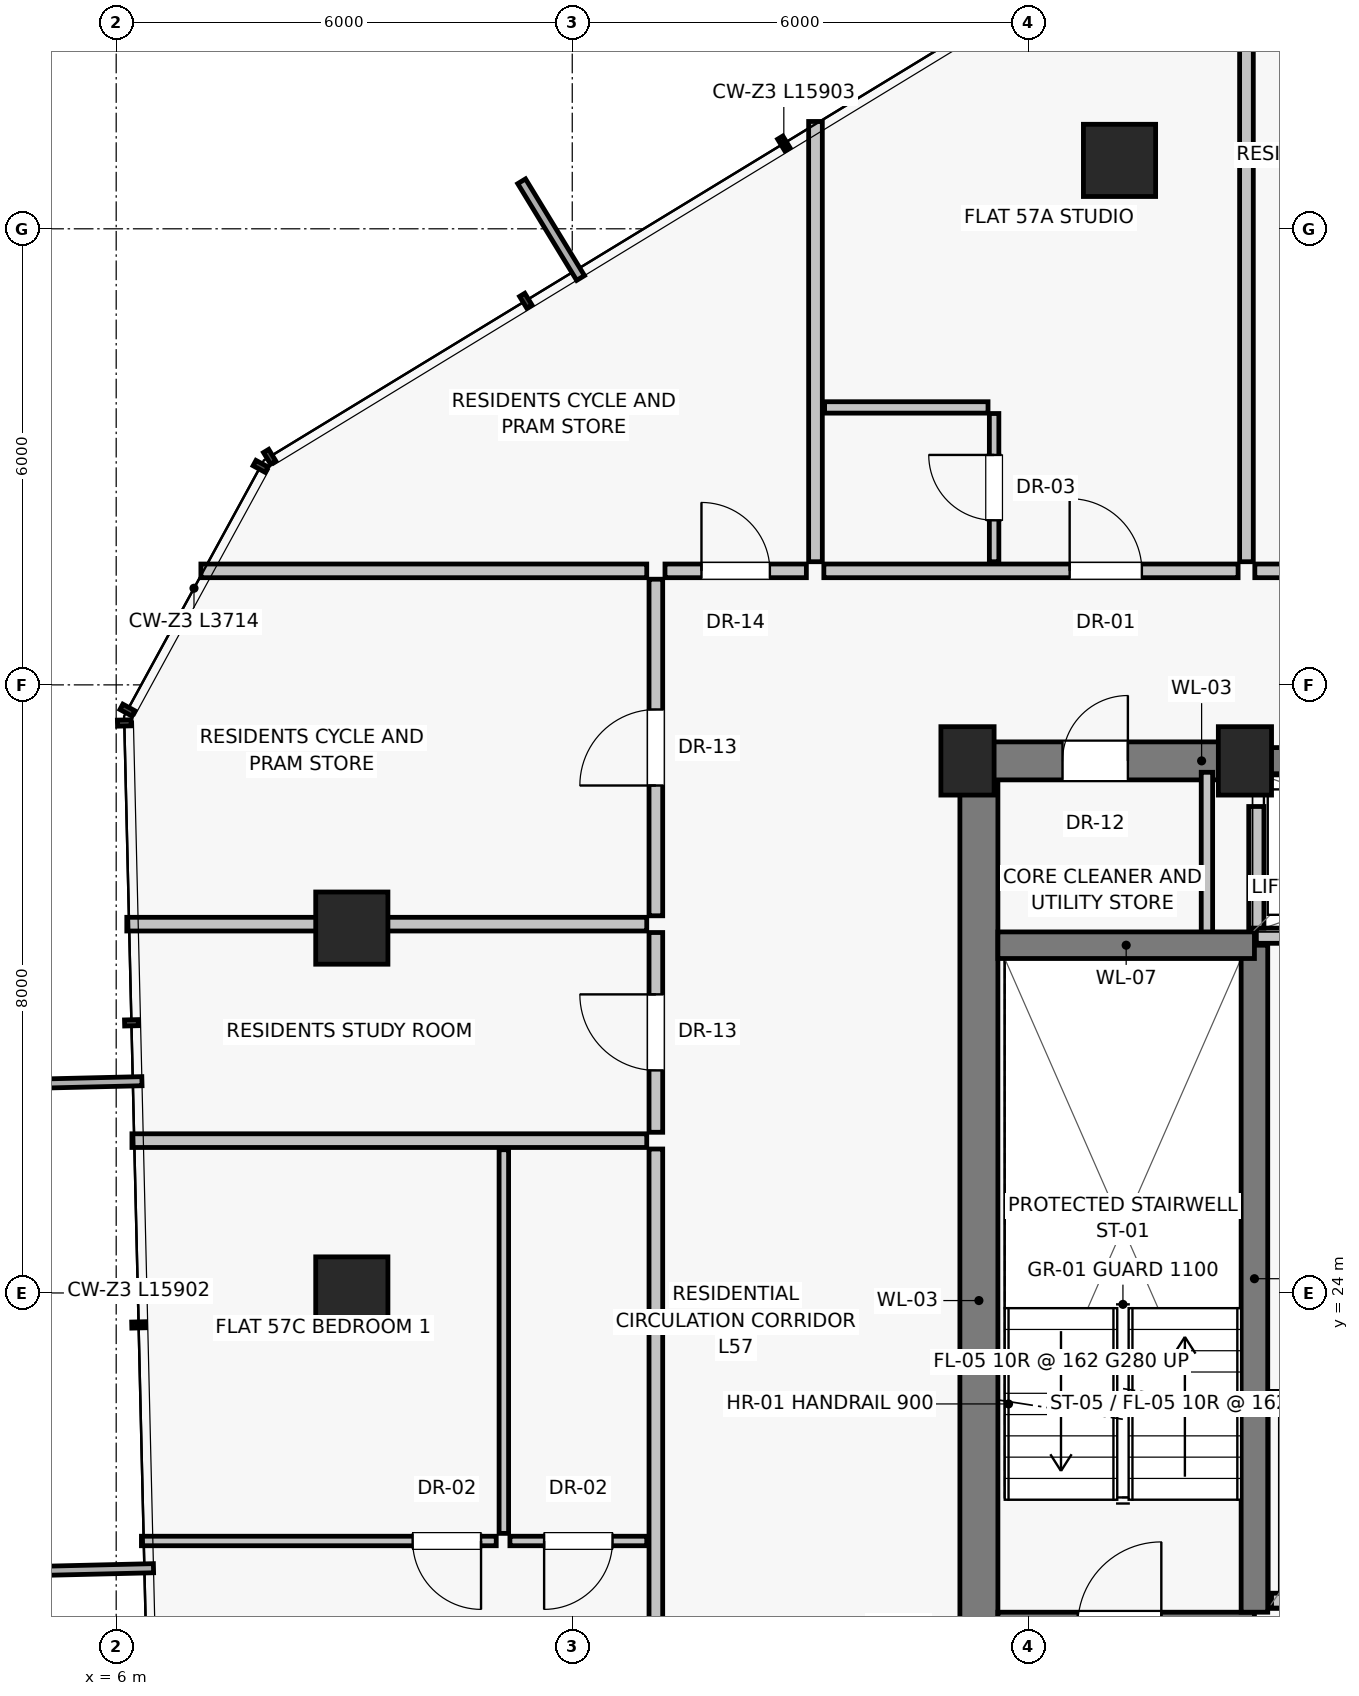
"""IFC4 building model, lengths in metres.
Left out: names, types, materials, properties, quantities, classifications, styles, units other than length and angle.
Written with IfcOpenShell. Run it as: python <this file> out.ifc"""

import sys

from ifc_helpers import new_model, si_unit, direction, frame, frame_2d, origin, origin_2d, place, context, subcontext, project, spatial, rectangle, extrude, source, transform, mapped, element, fill, save


model = new_model("IFC4")
c1 = context("Model", 3, precision=1e-05, world=origin(), true_north=direction((0.0, 1.0)))
c2 = subcontext(c1, "Body", "Model", "MODEL_VIEW")
j1 = project(units=[si_unit("LENGTHUNIT", "METRE"), si_unit("PLANEANGLEUNIT", "RADIAN")], contexts=[c1])
p1 = place(None, origin())
s1 = spatial("IfcSite", under=j1, at=p1, CompositionType="ELEMENT")
p2 = place(p1, origin())
s2 = spatial("IfcBuilding", under=s1, at=p2, CompositionType="ELEMENT")
p3 = place(p2, frame((0.0, 0.0, 201.6)))
s3 = spatial("IfcBuildingStorey", under=s2, at=p3, CompositionType="ELEMENT", Elevation=201.6)
for number, where, z_axis, x_axis in (
    (1, (17.2, 31.0, 0.0), (0.0, 0.0, 1.0), (1.0, 0.0, 0.0)),
    (2, (20.85, 31.0, 0.0), (0.0, 0.0, 1.0), (1.0, 0.0, 0.0)),
):
    element("IfcColumn", number, at=place(p3, frame(where, z_axis=z_axis, x_axis=x_axis)), inside=s3, PredefinedType="PILASTER", context=c2, shape_type="SweptSolid", body=[
        extrude(rectangle(XDim=0.7, YDim=0.9, at=origin_2d()), origin(), (0.0, 0.0, 1.0), 3.25),
    ])
for number, where, z_axis, x_axis in (
    (3, (19.2, 38.9, 0.0), (0.0, 0.0, 1.0), (1.0, 0.0, 0.0)),
    (4, (9.1, 28.8, 0.0), (0.0, 0.0, 1.0), (1.0, 0.0, 0.0)),
    (5, (9.1, 24.0, 0.0), (0.0, 0.0, 1.0), (1.0, 0.0, 0.0)),
):
    element("IfcColumn", number, at=place(p3, frame(where, z_axis=z_axis, x_axis=x_axis)), inside=s3, PredefinedType="COLUMN", context=c2, shape_type="SweptSolid", body=[
        extrude(rectangle(XDim=0.95, YDim=0.95, at=origin_2d()), origin(), (0.0, 0.0, 1.0), 3.25),
    ])
p4 = place(p3, frame((17.35, 16.8, 0.0), z_axis=(0.0, 0.0, 1.0), x_axis=(0.0, 1.0, 0.0)))
e6 = element("IfcWall", 6, at=p4, inside=s3, PredefinedType="SHEAR", context=c2, shape_type="SweptSolid", body=[
    extrude(rectangle(XDim=14.2, YDim=0.5, at=frame_2d((7.1, 0.0))), origin(), (0.0, 0.0, 1.0), 3.015),
])
p5 = place(p3, frame((17.2, 31.0, 0.0), z_axis=(0.0, 0.0, 1.0), x_axis=(1.0, 0.0, 0.0)))
e7 = element("IfcWall", 7, at=p5, inside=s3, PredefinedType="SHEAR", context=c2, shape_type="SweptSolid", body=[
    extrude(rectangle(XDim=3.8, YDim=0.5, at=frame_2d((1.9, 0.0))), origin(), (0.0, 0.0, 1.0), 3.015),
])
p6 = place(p5, frame((1.25, 0.0, 0.0)))
e8 = element("IfcOpeningElement", 8, at=p6, cuts=e7, PredefinedType="OPENING", context=c2, shape_type="SweptSolid", body=[
    extrude(rectangle(XDim=0.86, YDim=2.01, at=frame_2d((0.43, 1.005))), frame((0.0, 0.26, 0.0), z_axis=(0.0, -1.0, 0.0), x_axis=(1.0, 0.0, 0.0)), (0.0, 0.0, 1.0), 0.52),
])
p7 = place(p3, frame((21.0, 31.0, 0.0), z_axis=(0.0, 0.0, 1.0), x_axis=(1.0, 0.0, 0.0)))
e9 = element("IfcWall", 9, at=p7, inside=s3, PredefinedType="SHEAR", context=c2, shape_type="SweptSolid", body=[
    extrude(rectangle(XDim=6.0, YDim=0.35, at=frame_2d((3.0, 0.0))), origin(), (0.0, 0.0, 1.0), 3.015),
])
p8 = place(p7, frame((0.5, 0.0, 0.0)))
e10 = element("IfcOpeningElement", 10, at=p8, cuts=e9, PredefinedType="OPENING", context=c2, shape_type="SweptSolid", body=[
    extrude(rectangle(XDim=1.1, YDim=2.08, at=frame_2d((0.55, 1.04))), frame((0.0, 0.185, 0.0), z_axis=(0.0, -1.0, 0.0), x_axis=(1.0, 0.0, 0.0)), (0.0, 0.0, 1.0), 0.37),
])
p9 = place(p7, frame((2.45, 0.0, 0.0)))
e11 = element("IfcOpeningElement", 11, at=p9, cuts=e9, PredefinedType="OPENING", context=c2, shape_type="SweptSolid", body=[
    extrude(rectangle(XDim=1.1, YDim=2.08, at=frame_2d((0.55, 1.04))), frame((0.0, 0.185, 0.0), z_axis=(0.0, -1.0, 0.0), x_axis=(1.0, 0.0, 0.0)), (0.0, 0.0, 1.0), 0.37),
])
p10 = place(p7, frame((4.4, 0.0, 0.0)))
e12 = element("IfcOpeningElement", 12, at=p10, cuts=e9, PredefinedType="OPENING", context=c2, shape_type="SweptSolid", body=[
    extrude(rectangle(XDim=1.1, YDim=2.08, at=frame_2d((0.55, 1.04))), frame((0.0, 0.185, 0.0), z_axis=(0.0, -1.0, 0.0), x_axis=(1.0, 0.0, 0.0)), (0.0, 0.0, 1.0), 0.37),
])
p11 = place(p3, frame((20.35, 28.65, 0.0), z_axis=(0.0, 0.0, 1.0), x_axis=(0.0, 1.0, 0.0)))
e13 = element("IfcWall", 13, at=p11, inside=s3, PredefinedType="PARTITIONING", context=c2, shape_type="SweptSolid", body=[
    extrude(rectangle(XDim=2.2, YDim=0.15, at=frame_2d((1.1, 0.0))), origin(), (0.0, 0.0, 1.0), 3.015),
])
p12 = place(p3, frame((17.6, 19.625, 0.0), z_axis=(0.0, 0.0, 1.0), x_axis=(1.0, 0.0, 0.0)))
e14 = element("IfcWall", 14, at=p12, inside=s3, PredefinedType="SHEAR", context=c2, shape_type="SweptSolid", body=[
    extrude(rectangle(XDim=3.375, YDim=0.35, at=frame_2d((1.688, 0.0))), origin(), (0.0, 0.0, 1.0), 3.015),
])
p13 = place(p12, frame((1.05, 0.0, 0.0)))
e15 = element("IfcOpeningElement", 15, at=p13, cuts=e14, PredefinedType="OPENING", context=c2, shape_type="SweptSolid", body=[
    extrude(rectangle(XDim=1.1, YDim=2.03, at=frame_2d((0.55, 1.015))), frame((0.0, 0.185, 0.0), z_axis=(0.0, -1.0, 0.0), x_axis=(1.0, 0.0, 0.0)), (0.0, 0.0, 1.0), 0.37),
])
p14 = place(p3, frame((21.2, 19.95, 0.0), z_axis=(0.0, 0.0, 1.0), x_axis=(1.0, 0.0, 0.0)))
e16 = element("IfcWall", 16, at=p14, inside=s3, PredefinedType="SOLIDWALL", context=c2, shape_type="SweptSolid", body=[
    extrude(rectangle(XDim=1.85, YDim=0.2, at=frame_2d((0.925, 0.0))), origin(), (0.0, 0.0, 1.0), 3.015),
])
p15 = place(p14, frame((0.3, 0.0, 0.0)))
e17 = element("IfcOpeningElement", 17, at=p15, cuts=e16, PredefinedType="OPENING", context=c2, shape_type="SweptSolid", body=[
    extrude(rectangle(XDim=1.3, YDim=2.25, at=frame_2d((0.65, 1.125))), frame((0.0, 0.11, 0.0), z_axis=(0.0, -1.0, 0.0), x_axis=(1.0, 0.0, 0.0)), (0.0, 0.0, 1.0), 0.22),
])
p16 = place(p3, frame((20.975, 19.8, 0.0), z_axis=(0.0, 0.0, 1.0), x_axis=(0.0, 1.0, 0.0)))
e18 = element("IfcWall", 18, at=p16, inside=s3, PredefinedType="SHEAR", context=c2, shape_type="SweptSolid", body=[
    extrude(rectangle(XDim=8.775, YDim=0.35, at=frame_2d((4.387, 0.0))), origin(), (0.0, 0.0, 1.0), 3.015),
])
p17 = place(p3, frame((17.6, 28.575, 0.0), z_axis=(0.0, 0.0, 1.0), x_axis=(1.0, 0.0, 0.0)))
e19 = element("IfcWall", 19, at=p17, inside=s3, PredefinedType="SHEAR", context=c2, shape_type="SweptSolid", body=[
    extrude(rectangle(XDim=3.375, YDim=0.35, at=frame_2d((1.688, 0.0))), origin(), (0.0, 0.0, 1.0), 3.015),
])
p18 = place(p3, frame((21.2, 22.6, 0.0), z_axis=(0.0, 0.0, 1.0), x_axis=(1.0, 0.0, 0.0)))
e20 = element("IfcWall", 20, at=p18, inside=s3, PredefinedType="SOLIDWALL", context=c2, shape_type="SweptSolid", body=[
    extrude(rectangle(XDim=1.85, YDim=0.2, at=frame_2d((0.925, 0.0))), origin(), (0.0, 0.0, 1.0), 3.015),
])
p19 = place(p3, frame((21.0, 28.7, 0.0), z_axis=(0.0, 0.0, 1.0), x_axis=(1.0, 0.0, 0.0)))
e21 = element("IfcWall", 21, at=p19, inside=s3, PredefinedType="SOLIDWALL", context=c2, shape_type="SweptSolid", body=[
    extrude(rectangle(XDim=6.0, YDim=0.2, at=frame_2d((3.0, 0.0))), origin(), (0.0, 0.0, 1.0), 3.015),
])
p20 = place(p3, frame((21.0, 28.8, 0.0), z_axis=(0.0, 0.0, 1.0), x_axis=(0.0, 1.0, 0.0)))
e22 = element("IfcWall", 22, at=p20, inside=s3, PredefinedType="SOLIDWALL", context=c2, shape_type="SweptSolid", body=[
    extrude(rectangle(XDim=1.6, YDim=0.2, at=frame_2d((0.8, 0.0))), origin(), (0.0, 0.0, 1.0), 3.015),
])
p21 = place(p3, frame((15.2, 33.62, 0.0), z_axis=(0.0, 0.0, 1.0), x_axis=(0.0, 1.0, 0.0)))
e23 = element("IfcWall", 23, at=p21, inside=s3, PredefinedType="PARTITIONING", context=c2, shape_type="SweptSolid", body=[
    extrude(rectangle(XDim=5.792, YDim=0.18, at=frame_2d((2.896, 0.0))), origin(), (0.0, 0.0, 1.0), 3.015),
])
p22 = place(p3, frame((20.98, 33.5, 0.0), z_axis=(0.0, 0.0, 1.0), x_axis=(1.0, 0.0, 0.0)))
e24 = element("IfcWall", 24, at=p22, inside=s3, PredefinedType="PARTITIONING", context=c2, shape_type="SweptSolid", body=[
    extrude(rectangle(XDim=2.73, YDim=0.18, at=frame_2d((1.365, 0.0))), origin(), (0.0, 0.0, 1.0), 3.015),
])
p23 = place(p22, frame((0.865, 0.0, 0.0)))
e25 = element("IfcOpeningElement", 25, at=p23, cuts=e24, PredefinedType="OPENING", context=c2, shape_type="SweptSolid", body=[
    extrude(rectangle(XDim=1.0, YDim=2.01, at=frame_2d((0.5, 1.005))), frame((0.0, 0.1, 0.0), z_axis=(0.0, -1.0, 0.0), x_axis=(1.0, 0.0, 0.0)), (0.0, 0.0, 1.0), 0.2),
])
p24 = place(p3, frame((20.87, 33.62, 0.0), z_axis=(0.0, 0.0, 1.0), x_axis=(0.0, 1.0, 0.0)))
e26 = element("IfcWall", 26, at=p24, inside=s3, PredefinedType="PARTITIONING", context=c2, shape_type="SweptSolid", body=[
    extrude(rectangle(XDim=9.248, YDim=0.18, at=frame_2d((4.624, 0.0))), origin(), (0.0, 0.0, 1.0), 3.015),
])
p25 = place(p3, frame((15.31, 33.5, 0.0), z_axis=(0.0, 0.0, 1.0), x_axis=(1.0, 0.0, 0.0)))
e27 = element("IfcWall", 27, at=p25, inside=s3, PredefinedType="PARTITIONING", context=c2, shape_type="SweptSolid", body=[
    extrude(rectangle(XDim=5.45, YDim=0.18, at=frame_2d((2.725, 0.0))), origin(), (0.0, 0.0, 1.0), 3.015),
])
p26 = place(p25, frame((3.234, 0.0, 0.0)))
e28 = element("IfcOpeningElement", 28, at=p26, cuts=e27, PredefinedType="OPENING", context=c2, shape_type="SweptSolid", body=[
    extrude(rectangle(XDim=0.95, YDim=2.02, at=frame_2d((0.475, 1.01))), frame((0.0, 0.1, 0.0), z_axis=(0.0, -1.0, 0.0), x_axis=(1.0, 0.0, 0.0)), (0.0, 0.0, 1.0), 0.2),
])
p27 = place(p3, frame((17.55, 33.62, 0.0), z_axis=(0.0, 0.0, 1.0), x_axis=(0.0, 1.0, 0.0)))
e29 = element("IfcWall", 29, at=p27, inside=s3, PredefinedType="PARTITIONING", context=c2, shape_type="SweptSolid", body=[
    extrude(rectangle(XDim=1.95, YDim=0.125, at=frame_2d((0.975, 0.0))), origin(), (0.0, 0.0, 1.0), 3.015),
])
p28 = place(p27, frame((0.545, 0.0, 0.0)))
e30 = element("IfcOpeningElement", 30, at=p28, cuts=e29, PredefinedType="OPENING", context=c2, shape_type="SweptSolid", body=[
    extrude(rectangle(XDim=0.86, YDim=2.01, at=frame_2d((0.43, 1.005))), frame((0.0, 0.073, 0.0), z_axis=(0.0, -1.0, 0.0), x_axis=(1.0, 0.0, 0.0)), (0.0, 0.0, 1.0), 0.145),
])
p29 = place(p3, frame((15.32, 35.65, 0.0), z_axis=(0.0, 0.0, 1.0), x_axis=(1.0, 0.0, 0.0)))
e31 = element("IfcWall", 31, at=p29, inside=s3, PredefinedType="PARTITIONING", context=c2, shape_type="SweptSolid", body=[
    extrude(rectangle(XDim=2.15, YDim=0.15, at=frame_2d((1.075, 0.0))), origin(), (0.0, 0.0, 1.0), 3.015),
])
p30 = place(p3, frame((12.98, 33.5, 0.0), z_axis=(0.0, 0.0, 1.0), x_axis=(-1.0, 0.0, 0.0)))
e32 = element("IfcWall", 32, at=p30, inside=s3, PredefinedType="PARTITIONING", context=c2, shape_type="SweptSolid", body=[
    extrude(rectangle(XDim=5.866, YDim=0.18, at=frame_2d((2.933, 0.0))), origin(), (0.0, 0.0, 1.0), 3.015),
])
p31 = place(p3, frame((13.1, 14.41, 0.0), z_axis=(0.0, 0.0, 1.0), x_axis=(0.0, 1.0, 0.0)))
e33 = element("IfcWall", 33, at=p31, inside=s3, PredefinedType="PARTITIONING", context=c2, shape_type="SweptSolid", body=[
    extrude(rectangle(XDim=11.484, YDim=0.18, at=frame_2d((5.742, 0.0))), origin(), (0.0, 0.0, 1.0), 2.662),
])
p32 = place(p31, frame((3.759, 0.0, 0.0)))
e34 = element("IfcOpeningElement", 34, at=p32, cuts=e33, PredefinedType="OPENING", context=c2, shape_type="SweptSolid", body=[
    extrude(rectangle(XDim=0.95, YDim=2.02, at=frame_2d((0.475, 1.01))), frame((0.0, 0.1, 0.0), z_axis=(0.0, -1.0, 0.0), x_axis=(1.0, 0.0, 0.0)), (0.0, 0.0, 1.0), 0.2),
])
p33 = place(p3, frame((12.98, 20.737, 0.0), z_axis=(0.0, 0.0, 1.0), x_axis=(-1.0, 0.0, 0.0)))
e35 = element("IfcWall", 35, at=p33, inside=s3, PredefinedType="PARTITIONING", context=c2, shape_type="SweptSolid", body=[
    extrude(rectangle(XDim=1.8, YDim=0.125, at=frame_2d((0.9, 0.0))), origin(), (0.0, 0.0, 1.0), 3.015),
])
p34 = place(p33, frame((0.45, 0.0, 0.0)))
e36 = element("IfcOpeningElement", 36, at=p34, cuts=e35, PredefinedType="OPENING", context=c2, shape_type="SweptSolid", body=[
    extrude(rectangle(XDim=0.9, YDim=2.01, at=frame_2d((0.45, 1.005))), frame((0.0, 0.073, 0.0), z_axis=(0.0, -1.0, 0.0), x_axis=(1.0, 0.0, 0.0)), (0.0, 0.0, 1.0), 0.145),
])
p35 = place(p3, frame((11.1, 20.837, 0.0), z_axis=(0.0, 0.0, 1.0), x_axis=(0.0, 1.0, 0.0)))
e37 = element("IfcWall", 37, at=p35, inside=s3, PredefinedType="PARTITIONING", context=c2, shape_type="SweptSolid", body=[
    extrude(rectangle(XDim=5.047, YDim=0.125, at=frame_2d((2.523, 0.0))), origin(), (0.0, 0.0, 1.0), 3.015),
])
p36 = place(p3, frame((11.0, 20.737, 0.0), z_axis=(0.0, 0.0, 1.0), x_axis=(-1.0, 0.0, 0.0)))
e38 = element("IfcWall", 38, at=p36, inside=s3, PredefinedType="PARTITIONING", context=c2, shape_type="SweptSolid", body=[
    extrude(rectangle(XDim=4.668, YDim=0.125, at=frame_2d((2.334, 0.0))), origin(), (0.0, 0.0, 1.0), 3.015),
])
p37 = place(p36, frame((0.2, 0.0, 0.0)))
e39 = element("IfcOpeningElement", 39, at=p37, cuts=e38, PredefinedType="OPENING", context=c2, shape_type="SweptSolid", body=[
    extrude(rectangle(XDim=0.9, YDim=2.01, at=frame_2d((0.45, 1.005))), frame((0.0, 0.073, 0.0), z_axis=(0.0, -1.0, 0.0), x_axis=(1.0, 0.0, 0.0)), (0.0, 0.0, 1.0), 0.145),
])
p38 = place(p3, frame((12.98, 26.004, 0.0), z_axis=(0.0, 0.0, 1.0), x_axis=(-1.0, 0.0, 0.0)))
e40 = element("IfcWall", 40, at=p38, inside=s3, PredefinedType="PARTITIONING", context=c2, shape_type="SweptSolid", body=[
    extrude(rectangle(XDim=6.773, YDim=0.18, at=frame_2d((3.386, 0.0))), origin(), (0.0, 0.0, 1.0), 3.015),
])
p39 = place(p3, frame((13.1, 26.114, 0.0), z_axis=(0.0, 0.0, 1.0), x_axis=(0.0, 1.0, 0.0)))
e41 = element("IfcWall", 41, at=p39, inside=s3, PredefinedType="PARTITIONING", context=c2, shape_type="SweptSolid", body=[
    extrude(rectangle(XDim=2.628, YDim=0.18, at=frame_2d((1.314, 0.0))), origin(), (0.0, 0.0, 1.0), 2.662),
])
p40 = place(p39, frame((0.814, 0.0, 0.0)))
e42 = element("IfcOpeningElement", 42, at=p40, cuts=e41, PredefinedType="OPENING", context=c2, shape_type="SweptSolid", body=[
    extrude(rectangle(XDim=1.0, YDim=2.01, at=frame_2d((0.5, 1.005))), frame((0.0, 0.1, 0.0), z_axis=(0.0, -1.0, 0.0), x_axis=(1.0, 0.0, 0.0)), (0.0, 0.0, 1.0), 0.2),
])
p41 = place(p3, frame((13.1, 28.962, 0.0), z_axis=(0.0, 0.0, 1.0), x_axis=(0.0, 1.0, 0.0)))
e43 = element("IfcWall", 43, at=p41, inside=s3, PredefinedType="PARTITIONING", context=c2, shape_type="SweptSolid", body=[
    extrude(rectangle(XDim=4.428, YDim=0.18, at=frame_2d((2.214, 0.0))), origin(), (0.0, 0.0, 1.0), 2.662),
])
p42 = place(p41, frame((1.714, 0.0, 0.0)))
e44 = element("IfcOpeningElement", 44, at=p42, cuts=e43, PredefinedType="OPENING", context=c2, shape_type="SweptSolid", body=[
    extrude(rectangle(XDim=1.0, YDim=2.01, at=frame_2d((0.5, 1.005))), frame((0.0, 0.1, 0.0), z_axis=(0.0, -1.0, 0.0), x_axis=(1.0, 0.0, 0.0)), (0.0, 0.0, 1.0), 0.2),
])
p43 = place(p3, frame((12.98, 28.852, 0.0), z_axis=(0.0, 0.0, 1.0), x_axis=(-1.0, 0.0, 0.0)))
e45 = element("IfcWall", 45, at=p43, inside=s3, PredefinedType="PARTITIONING", context=c2, shape_type="SweptSolid", body=[
    extrude(rectangle(XDim=6.84, YDim=0.18, at=frame_2d((3.42, 0.0))), origin(), (0.0, 0.0, 1.0), 2.469),
])
p44 = place(p3, frame((13.22, 33.5, 0.0), z_axis=(0.0, 0.0, 1.0), x_axis=(1.0, 0.0, 0.0)))
e46 = element("IfcWall", 46, at=p44, inside=s3, PredefinedType="PARTITIONING", context=c2, shape_type="SweptSolid", body=[
    extrude(rectangle(XDim=1.86, YDim=0.18, at=frame_2d((0.93, 0.0))), origin(), (0.0, 0.0, 1.0), 3.015),
])
p45 = place(p44, frame((0.48, 0.0, 0.0)))
e47 = element("IfcOpeningElement", 47, at=p45, cuts=e46, PredefinedType="OPENING", context=c2, shape_type="SweptSolid", body=[
    extrude(rectangle(XDim=0.9, YDim=2.01, at=frame_2d((0.45, 1.005))), frame((0.0, 0.1, 0.0), z_axis=(0.0, -1.0, 0.0), x_axis=(1.0, 0.0, 0.0)), (0.0, 0.0, 1.0), 0.2),
])
m1 = source(origin(), c2, "Body", "SweptSolid", [
    extrude(rectangle(XDim=0.86, YDim=2.01, at=frame_2d((0.43, 1.005))), frame((0.0, 0.025, 0.0), z_axis=(0.0, -1.0, 0.0), x_axis=(1.0, 0.0, 0.0)), (0.0, 0.0, 1.0), 0.05),
])
p46 = place(p6, origin())
e48 = element("IfcDoor", 48, at=p46, inside=s3, OperationType="SINGLE_SWING_RIGHT", PredefinedType="DOOR", context=c2, shape_type="MappedRepresentation", body=[
    mapped(m1, transform((0.0, 0.0, 0.0), scale=1.0)),
])
fill(e8, e48)
m2 = source(origin(), c2, "Body", "SweptSolid", [
    extrude(rectangle(XDim=0.95, YDim=2.02, at=frame_2d((0.475, 1.01))), frame((0.0, 0.025, 0.0), z_axis=(0.0, -1.0, 0.0), x_axis=(1.0, 0.0, 0.0)), (0.0, 0.0, 1.0), 0.05),
])
p47 = place(p26, origin())
e49 = element("IfcDoor", 49, at=p47, inside=s3, OperationType="SINGLE_SWING_LEFT", PredefinedType="DOOR", context=c2, shape_type="MappedRepresentation", body=[
    mapped(m2, transform((0.0, 0.0, 0.0), scale=1.0)),
])
fill(e28, e49)
p48 = place(p28, origin())
e50 = element("IfcDoor", 50, at=p48, inside=s3, OperationType="SINGLE_SWING_RIGHT", PredefinedType="DOOR", context=c2, shape_type="MappedRepresentation", body=[
    mapped(m1, transform((0.0, 0.0, 0.0), scale=1.0)),
])
fill(e30, e50)
m3 = source(origin(), c2, "Body", "SweptSolid", [
    extrude(rectangle(XDim=0.9, YDim=2.01, at=frame_2d((0.45, 1.005))), frame((0.0, 0.025, 0.0), z_axis=(0.0, -1.0, 0.0), x_axis=(1.0, 0.0, 0.0)), (0.0, 0.0, 1.0), 0.05),
])
p49 = place(p34, origin())
e51 = element("IfcDoor", 51, at=p49, inside=s3, OperationType="SINGLE_SWING_RIGHT", PredefinedType="DOOR", context=c2, shape_type="MappedRepresentation", body=[
    mapped(m3, transform((0.0, 0.0, 0.0), scale=1.0)),
])
fill(e36, e51)
p50 = place(p37, origin())
e52 = element("IfcDoor", 52, at=p50, inside=s3, OperationType="SINGLE_SWING_LEFT", PredefinedType="DOOR", context=c2, shape_type="MappedRepresentation", body=[
    mapped(m3, transform((0.0, 0.0, 0.0), scale=1.0)),
])
fill(e39, e52)
m4 = source(origin(), c2, "Body", "SweptSolid", [
    extrude(rectangle(XDim=1.0, YDim=2.01, at=frame_2d((0.5, 1.005))), frame((0.0, 0.025, 0.0), z_axis=(0.0, -1.0, 0.0), x_axis=(1.0, 0.0, 0.0)), (0.0, 0.0, 1.0), 0.05),
])
p51 = place(p40, origin())
e53 = element("IfcDoor", 53, at=p51, inside=s3, OperationType="SINGLE_SWING_RIGHT", PredefinedType="DOOR", context=c2, shape_type="MappedRepresentation", body=[
    mapped(m4, transform((0.0, 0.0, 0.0), scale=1.0)),
])
fill(e42, e53)
p52 = place(p42, origin())
e54 = element("IfcDoor", 54, at=p52, inside=s3, OperationType="SINGLE_SWING_LEFT", PredefinedType="DOOR", context=c2, shape_type="MappedRepresentation", body=[
    mapped(m4, transform((0.0, 0.0, 0.0), scale=1.0)),
])
fill(e44, e54)
p53 = place(p45, origin())
e55 = element("IfcDoor", 55, at=p53, inside=s3, OperationType="SINGLE_SWING_LEFT", PredefinedType="DOOR", context=c2, shape_type="MappedRepresentation", body=[
    mapped(m3, transform((0.0, 0.0, 0.0), scale=1.0)),
])
fill(e47, e55)
save(model, sys.argv[1])
